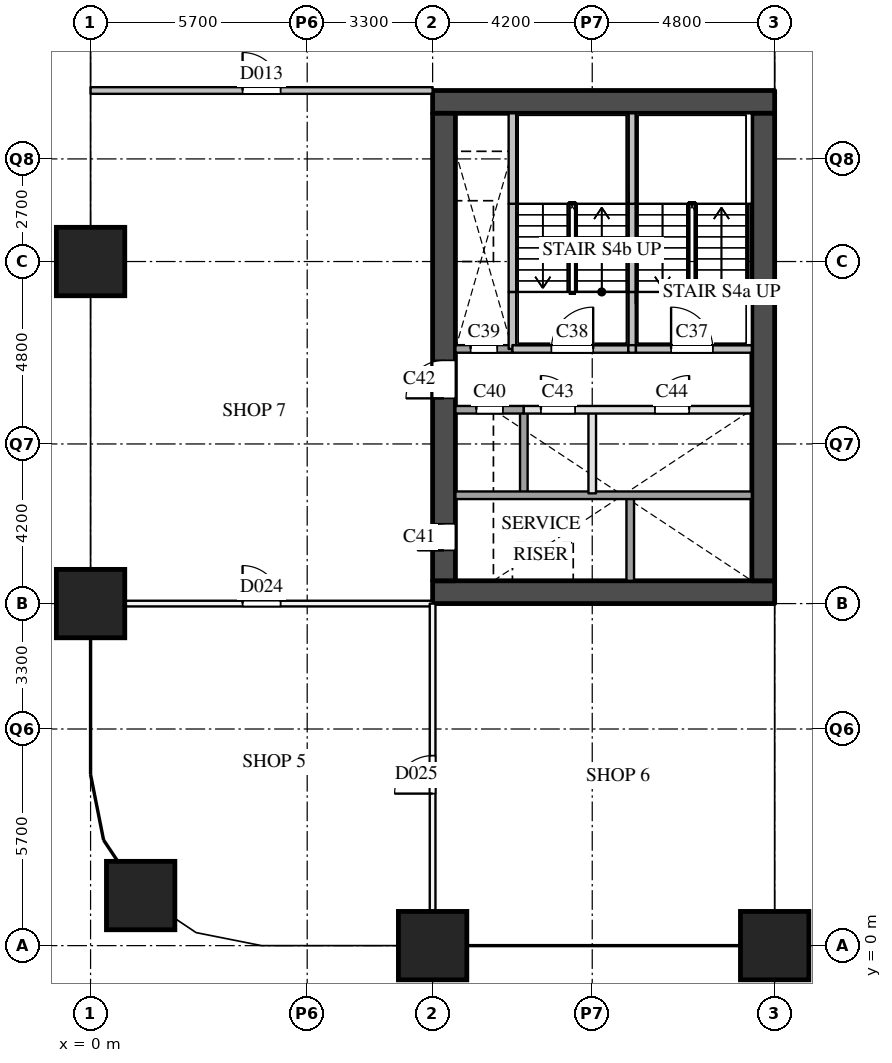
"""IFC4 building model, lengths in metres.
Left out: names, types, materials, properties, quantities, classifications, styles, units other than length and angle.
Written with IfcOpenShell. Run it as: python <this file> out.ifc"""

import sys

from ifc_helpers import new_model, si_unit, direction, frame, frame_2d, origin, origin_2d, place, context, subcontext, project, spatial, rectangle, extrude, element, fill, save


model = new_model("IFC4")
c1 = context("Model", 3, precision=1e-05, world=origin(), true_north=direction((0.0, 1.0)))
c2 = subcontext(c1, "Body", "Model", "MODEL_VIEW")
j1 = project(units=[si_unit("LENGTHUNIT", "METRE"), si_unit("PLANEANGLEUNIT", "RADIAN")], contexts=[c1])
p1 = place(None, origin())
s1 = spatial("IfcSite", under=j1, at=p1, CompositionType="ELEMENT")
p2 = place(p1, origin())
s2 = spatial("IfcBuilding", under=s1, at=p2, CompositionType="ELEMENT")
p3 = place(p2, frame((0.0, 0.0, 8.0)))
s3 = spatial("IfcBuildingStorey", under=s2, at=p3, CompositionType="ELEMENT", Elevation=8.0)
for number, where, z_axis, x_axis in (
    (1, (1.318, 1.318, 0.0), (0.0, 0.0, 1.0), (1.0, 0.0, 0.0)),
    (2, (0.0, 9.0, 0.0), (0.0, 0.0, 1.0), (1.0, 0.0, 0.0)),
    (3, (0.0, 18.0, 0.0), (0.0, 0.0, 1.0), (1.0, 0.0, 0.0)),
    (4, (9.0, 0.0, 0.0), (0.0, 0.0, 1.0), (1.0, 0.0, 0.0)),
    (5, (18.0, 0.0, 0.0), (0.0, 0.0, 1.0), (1.0, 0.0, 0.0)),
):
    element("IfcColumn", number, at=place(p3, frame(where, z_axis=z_axis, x_axis=x_axis)), inside=s3, PredefinedType="COLUMN", context=c2, shape_type="SweptSolid", body=[
        extrude(rectangle(XDim=1.8, YDim=1.8, at=origin_2d()), origin(), (0.0, 0.0, 1.0), 6.0),
    ])
for number, where, z_axis, x_axis in (
    (6, (9.0, 9.3, 0.0), (0.0, 0.0, 1.0), (1.0, 0.0, 0.0)),
    (7, (9.0, 22.2, 0.0), (0.0, 0.0, 1.0), (1.0, 0.0, 0.0)),
):
    element("IfcWall", number, at=place(p3, frame(where, z_axis=z_axis, x_axis=x_axis)), inside=s3, PredefinedType="SHEAR", context=c2, shape_type="SweptSolid", body=[
        extrude(rectangle(XDim=9.0, YDim=0.6, at=frame_2d((4.5, 0.0))), origin(), (0.0, 0.0, 1.0), 5.59),
    ])
p4 = place(p3, frame((9.3, 9.6, 0.0), z_axis=(0.0, 0.0, 1.0), x_axis=(0.0, 1.0, 0.0)))
e8 = element("IfcWall", 8, at=p4, inside=s3, PredefinedType="SHEAR", context=c2, shape_type="SweptSolid", body=[
    extrude(rectangle(XDim=12.3, YDim=0.6, at=frame_2d((6.15, 0.0))), origin(), (0.0, 0.0, 1.0), 5.59),
])
p5 = place(p4, frame((0.8, 0.0, 0.0)))
e9 = element("IfcOpeningElement", 9, at=p5, cuts=e8, PredefinedType="OPENING", context=c2, shape_type="SweptSolid", body=[
    extrude(rectangle(XDim=0.7, YDim=2.1, at=frame_2d((0.35, 1.05))), frame((0.0, 0.31, 0.0), z_axis=(0.0, -1.0, 0.0), x_axis=(1.0, 0.0, 0.0)), (0.0, 0.0, 1.0), 0.62),
])
p6 = place(p4, frame((4.8, 0.0, 0.0)))
e10 = element("IfcOpeningElement", 10, at=p6, cuts=e8, PredefinedType="OPENING", context=c2, shape_type="SweptSolid", body=[
    extrude(rectangle(XDim=1.0, YDim=2.1, at=frame_2d((0.5, 1.05))), frame((0.0, 0.31, 0.0), z_axis=(0.0, -1.0, 0.0), x_axis=(1.0, 0.0, 0.0)), (0.0, 0.0, 1.0), 0.62),
])
p7 = place(p3, frame((17.7, 9.6, 0.0), z_axis=(0.0, 0.0, 1.0), x_axis=(0.0, 1.0, 0.0)))
e11 = element("IfcWall", 11, at=p7, inside=s3, PredefinedType="SHEAR", context=c2, shape_type="SweptSolid", body=[
    extrude(rectangle(XDim=12.3, YDim=0.6, at=frame_2d((6.15, 0.0))), origin(), (0.0, 0.0, 1.0), 5.59),
])
p8 = place(p3, frame((11.1, 15.7, 0.0), z_axis=(0.0, 0.0, 1.0), x_axis=(0.0, 1.0, 0.0)))
e12 = element("IfcWall", 12, at=p8, inside=s3, PredefinedType="SOLIDWALL", context=c2, shape_type="SweptSolid", body=[
    extrude(rectangle(XDim=1.5, YDim=0.2, at=frame_2d((0.75, 0.0))), origin(), (0.0, 0.0, 1.0), 5.59),
])
p9 = place(p3, frame((11.1, 17.2, 0.0), z_axis=(0.0, 0.0, 1.0), x_axis=(0.0, 1.0, 0.0)))
e13 = element("IfcWall", 13, at=p9, inside=s3, PredefinedType="SOLIDWALL", context=c2, shape_type="SweptSolid", body=[
    extrude(rectangle(XDim=2.32, YDim=0.2, at=frame_2d((1.16, 0.0))), origin(), (0.0, 0.0, 1.0), 5.59),
])
p10 = place(p3, frame((11.1, 19.52, 0.0), z_axis=(0.0, 0.0, 1.0), x_axis=(0.0, 1.0, 0.0)))
e14 = element("IfcWall", 14, at=p10, inside=s3, PredefinedType="SOLIDWALL", context=c2, shape_type="SweptSolid", body=[
    extrude(rectangle(XDim=2.38, YDim=0.2, at=frame_2d((1.19, 0.0))), origin(), (0.0, 0.0, 1.0), 5.59),
])
p11 = place(p3, frame((11.4, 11.9, 0.0), z_axis=(0.0, 0.0, 1.0), x_axis=(0.0, 1.0, 0.0)))
e15 = element("IfcWall", 15, at=p11, inside=s3, PredefinedType="SOLIDWALL", context=c2, shape_type="SweptSolid", body=[
    extrude(rectangle(XDim=2.2, YDim=0.2, at=frame_2d((1.1, 0.0))), origin(), (0.0, 0.0, 1.0), 5.59),
])
p12 = place(p3, frame((13.2, 11.9, 0.0), z_axis=(0.0, 0.0, 1.0), x_axis=(0.0, 1.0, 0.0)))
e16 = element("IfcWall", 16, at=p12, inside=s3, PredefinedType="PARTITIONING", context=c2, shape_type="SweptSolid", body=[
    extrude(rectangle(XDim=2.2, YDim=0.2, at=frame_2d((1.1, 0.0))), origin(), (0.0, 0.0, 1.0), 5.59),
])
p13 = place(p3, frame((14.2, 9.6, 0.0), z_axis=(0.0, 0.0, 1.0), x_axis=(0.0, 1.0, 0.0)))
e17 = element("IfcWall", 17, at=p13, inside=s3, PredefinedType="SOLIDWALL", context=c2, shape_type="SweptSolid", body=[
    extrude(rectangle(XDim=2.3, YDim=0.2, at=frame_2d((1.15, 0.0))), origin(), (0.0, 0.0, 1.0), 5.59),
])
p14 = place(p3, frame((14.25, 15.7, 0.0), z_axis=(0.0, 0.0, 1.0), x_axis=(0.0, 1.0, 0.0)))
e18 = element("IfcWall", 18, at=p14, inside=s3, PredefinedType="SOLIDWALL", context=c2, shape_type="SweptSolid", body=[
    extrude(rectangle(XDim=1.5, YDim=0.2, at=frame_2d((0.75, 0.0))), origin(), (0.0, 0.0, 1.0), 5.59),
])
p15 = place(p3, frame((14.25, 17.2, 0.0), z_axis=(0.0, 0.0, 1.0), x_axis=(0.0, 1.0, 0.0)))
e19 = element("IfcWall", 19, at=p15, inside=s3, PredefinedType="SOLIDWALL", context=c2, shape_type="SweptSolid", body=[
    extrude(rectangle(XDim=2.32, YDim=0.2, at=frame_2d((1.16, 0.0))), origin(), (0.0, 0.0, 1.0), 5.59),
])
p16 = place(p3, frame((14.25, 19.52, 0.0), z_axis=(0.0, 0.0, 1.0), x_axis=(0.0, 1.0, 0.0)))
e20 = element("IfcWall", 20, at=p16, inside=s3, PredefinedType="SOLIDWALL", context=c2, shape_type="SweptSolid", body=[
    extrude(rectangle(XDim=2.38, YDim=0.2, at=frame_2d((1.19, 0.0))), origin(), (0.0, 0.0, 1.0), 5.59),
])
p17 = place(p3, frame((9.6, 11.85, 0.0), z_axis=(0.0, 0.0, 1.0), x_axis=(1.0, 0.0, 0.0)))
e21 = element("IfcWall", 21, at=p17, inside=s3, PredefinedType="SOLIDWALL", context=c2, shape_type="SweptSolid", body=[
    extrude(rectangle(XDim=7.8, YDim=0.2, at=frame_2d((3.9, 0.0))), origin(), (0.0, 0.0, 1.0), 5.59),
])
p18 = place(p3, frame((11.4, 14.1, 0.0), z_axis=(0.0, 0.0, 1.0), x_axis=(1.0, 0.0, 0.0)))
e22 = element("IfcWall", 22, at=p18, inside=s3, PredefinedType="PARTITIONING", context=c2, shape_type="SweptSolid", body=[
    extrude(rectangle(XDim=6.0, YDim=0.2, at=frame_2d((3.0, 0.0))), origin(), (0.0, 0.0, 1.0), 5.59),
])
p19 = place(p18, frame((0.45, 0.0, 0.0)))
e23 = element("IfcOpeningElement", 23, at=p19, cuts=e22, PredefinedType="OPENING", context=c2, shape_type="SweptSolid", body=[
    extrude(rectangle(XDim=0.9, YDim=2.1, at=frame_2d((0.45, 1.05))), frame((0.0, 0.11, 0.0), z_axis=(0.0, -1.0, 0.0), x_axis=(1.0, 0.0, 0.0)), (0.0, 0.0, 1.0), 0.22),
])
p20 = place(p18, frame((3.45, 0.0, 0.0)))
e24 = element("IfcOpeningElement", 24, at=p20, cuts=e22, PredefinedType="OPENING", context=c2, shape_type="SweptSolid", body=[
    extrude(rectangle(XDim=0.9, YDim=2.1, at=frame_2d((0.45, 1.05))), frame((0.0, 0.11, 0.0), z_axis=(0.0, -1.0, 0.0), x_axis=(1.0, 0.0, 0.0)), (0.0, 0.0, 1.0), 0.22),
])
p21 = place(p3, frame((9.6, 14.1, 0.0), z_axis=(0.0, 0.0, 1.0), x_axis=(1.0, 0.0, 0.0)))
e25 = element("IfcWall", 25, at=p21, inside=s3, PredefinedType="SOLIDWALL", context=c2, shape_type="SweptSolid", body=[
    extrude(rectangle(XDim=1.8, YDim=0.2, at=frame_2d((0.9, 0.0))), origin(), (0.0, 0.0, 1.0), 5.59),
])
p22 = place(p21, frame((0.55, 0.0, 0.0)))
e26 = element("IfcOpeningElement", 26, at=p22, cuts=e25, PredefinedType="OPENING", context=c2, shape_type="SweptSolid", body=[
    extrude(rectangle(XDim=0.7, YDim=2.1, at=frame_2d((0.35, 1.05))), frame((0.0, 0.11, 0.0), z_axis=(0.0, -1.0, 0.0), x_axis=(1.0, 0.0, 0.0)), (0.0, 0.0, 1.0), 0.22),
])
p23 = place(p3, frame((9.6, 15.7, 0.0), z_axis=(0.0, 0.0, 1.0), x_axis=(1.0, 0.0, 0.0)))
e27 = element("IfcWall", 27, at=p23, inside=s3, PredefinedType="SOLIDWALL", context=c2, shape_type="SweptSolid", body=[
    extrude(rectangle(XDim=1.5, YDim=0.2, at=frame_2d((0.75, 0.0))), origin(), (0.0, 0.0, 1.0), 5.59),
])
p24 = place(p23, frame((0.4, 0.0, 0.0)))
e28 = element("IfcOpeningElement", 28, at=p24, cuts=e27, PredefinedType="OPENING", context=c2, shape_type="SweptSolid", body=[
    extrude(rectangle(XDim=0.7, YDim=2.1, at=frame_2d((0.35, 1.05))), frame((0.0, 0.11, 0.0), z_axis=(0.0, -1.0, 0.0), x_axis=(1.0, 0.0, 0.0)), (0.0, 0.0, 1.0), 0.22),
])
p25 = place(p3, frame((11.1, 15.7, 0.0), z_axis=(0.0, 0.0, 1.0), x_axis=(1.0, 0.0, 0.0)))
e29 = element("IfcWall", 29, at=p25, inside=s3, PredefinedType="SOLIDWALL", context=c2, shape_type="SweptSolid", body=[
    extrude(rectangle(XDim=3.05, YDim=0.2, at=frame_2d((1.525, 0.0))), origin(), (0.0, 0.0, 1.0), 5.59),
])
p26 = place(p25, frame((1.025, 0.0, 0.0)))
e30 = element("IfcOpeningElement", 30, at=p26, cuts=e29, PredefinedType="OPENING", context=c2, shape_type="SweptSolid", body=[
    extrude(rectangle(XDim=1.1, YDim=2.1, at=frame_2d((0.55, 1.05))), frame((0.0, 0.11, 0.0), z_axis=(0.0, -1.0, 0.0), x_axis=(1.0, 0.0, 0.0)), (0.0, 0.0, 1.0), 0.22),
])
p27 = place(p3, frame((14.15, 15.7, 0.0), z_axis=(0.0, 0.0, 1.0), x_axis=(1.0, 0.0, 0.0)))
e31 = element("IfcWall", 31, at=p27, inside=s3, PredefinedType="SOLIDWALL", context=c2, shape_type="SweptSolid", body=[
    extrude(rectangle(XDim=0.2, YDim=0.2, at=frame_2d((0.1, 0.0))), origin(), (0.0, 0.0, 1.0), 5.59),
])
p28 = place(p3, frame((14.35, 15.7, 0.0), z_axis=(0.0, 0.0, 1.0), x_axis=(1.0, 0.0, 0.0)))
e32 = element("IfcWall", 32, at=p28, inside=s3, PredefinedType="SOLIDWALL", context=c2, shape_type="SweptSolid", body=[
    extrude(rectangle(XDim=3.05, YDim=0.2, at=frame_2d((1.525, 0.0))), origin(), (0.0, 0.0, 1.0), 5.59),
])
p29 = place(p28, frame((0.925, 0.0, 0.0)))
e33 = element("IfcOpeningElement", 33, at=p29, cuts=e32, PredefinedType="OPENING", context=c2, shape_type="SweptSolid", body=[
    extrude(rectangle(XDim=1.1, YDim=2.1, at=frame_2d((0.55, 1.05))), frame((0.0, 0.11, 0.0), z_axis=(0.0, -1.0, 0.0), x_axis=(1.0, 0.0, 0.0)), (0.0, 0.0, 1.0), 0.22),
])
p30 = place(p3, frame((0.0, 22.5, 0.0), z_axis=(0.0, 0.0, 1.0), x_axis=(1.0, 0.0, 0.0)))
e34 = element("IfcWall", 34, at=p30, inside=s3, PredefinedType="PARTITIONING", context=c2, shape_type="SweptSolid", body=[
    extrude(rectangle(XDim=9.0, YDim=0.175, at=frame_2d((4.5, 0.0))), origin(), (0.0, 0.0, 1.0), 4.59),
])
p31 = place(p30, frame((4.0, 0.0, 0.0)))
e35 = element("IfcOpeningElement", 35, at=p31, cuts=e34, PredefinedType="OPENING", context=c2, shape_type="SweptSolid", body=[
    extrude(rectangle(XDim=1.0, YDim=2.1, at=frame_2d((0.5, 1.05))), frame((0.0, 0.097, 0.0), z_axis=(0.0, -1.0, 0.0), x_axis=(1.0, 0.0, 0.0)), (0.0, 0.0, 1.0), 0.195),
])
p32 = place(p3, frame((0.0, 9.0, 0.0), z_axis=(0.0, 0.0, 1.0), x_axis=(1.0, 0.0, 0.0)))
e36 = element("IfcWall", 36, at=p32, inside=s3, PredefinedType="PARTITIONING", context=c2, shape_type="SweptSolid", body=[
    extrude(rectangle(XDim=9.0, YDim=0.15, at=frame_2d((4.5, 0.0))), origin(), (0.0, 0.0, 1.0), 5.59),
])
p33 = place(p32, frame((4.0, 0.0, 0.0)))
e37 = element("IfcOpeningElement", 37, at=p33, cuts=e36, PredefinedType="OPENING", context=c2, shape_type="SweptSolid", body=[
    extrude(rectangle(XDim=1.0, YDim=2.1, at=frame_2d((0.5, 1.05))), frame((0.0, 0.085, 0.0), z_axis=(0.0, -1.0, 0.0), x_axis=(1.0, 0.0, 0.0)), (0.0, 0.0, 1.0), 0.17),
])
p34 = place(p3, frame((9.0, 0.0, 0.0), z_axis=(0.0, 0.0, 1.0), x_axis=(0.0, 1.0, 0.0)))
e38 = element("IfcWall", 38, at=p34, inside=s3, PredefinedType="PARTITIONING", context=c2, shape_type="SweptSolid", body=[
    extrude(rectangle(XDim=9.0, YDim=0.15, at=frame_2d((4.5, 0.0))), origin(), (0.0, 0.0, 1.0), 5.59),
])
p35 = place(p34, frame((4.0, 0.0, 0.0)))
e39 = element("IfcOpeningElement", 39, at=p35, cuts=e38, PredefinedType="OPENING", context=c2, shape_type="SweptSolid", body=[
    extrude(rectangle(XDim=1.0, YDim=2.1, at=frame_2d((0.5, 1.05))), frame((0.0, 0.085, 0.0), z_axis=(0.0, -1.0, 0.0), x_axis=(1.0, 0.0, 0.0)), (0.0, 0.0, 1.0), 0.17),
])
p36 = place(p29, origin())
e40 = element("IfcDoor", 40, at=p36, inside=s3, OperationType="SINGLE_SWING_LEFT", PredefinedType="DOOR", context=c2, shape_type="SweptSolid", body=[
    extrude(rectangle(XDim=1.1, YDim=2.1, at=frame_2d((0.55, 1.05))), frame((0.0, 0.025, 0.0), z_axis=(0.0, -1.0, 0.0), x_axis=(1.0, 0.0, 0.0)), (0.0, 0.0, 1.0), 0.05),
])
fill(e33, e40)
p37 = place(p26, origin())
e41 = element("IfcDoor", 41, at=p37, inside=s3, OperationType="SINGLE_SWING_RIGHT", PredefinedType="DOOR", context=c2, shape_type="SweptSolid", body=[
    extrude(rectangle(XDim=1.1, YDim=2.1, at=frame_2d((0.55, 1.05))), frame((0.0, 0.025, 0.0), z_axis=(0.0, -1.0, 0.0), x_axis=(1.0, 0.0, 0.0)), (0.0, 0.0, 1.0), 0.05),
])
fill(e30, e41)
p38 = place(p24, origin())
e42 = element("IfcDoor", 42, at=p38, inside=s3, OperationType="SINGLE_SWING_LEFT", PredefinedType="DOOR", context=c2, shape_type="SweptSolid", body=[
    extrude(rectangle(XDim=0.7, YDim=2.1, at=frame_2d((0.35, 1.05))), frame((0.0, 0.025, 0.0), z_axis=(0.0, -1.0, 0.0), x_axis=(1.0, 0.0, 0.0)), (0.0, 0.0, 1.0), 0.05),
])
fill(e28, e42)
p39 = place(p22, origin())
e43 = element("IfcDoor", 43, at=p39, inside=s3, OperationType="SINGLE_SWING_LEFT", PredefinedType="DOOR", context=c2, shape_type="SweptSolid", body=[
    extrude(rectangle(XDim=0.7, YDim=2.1, at=frame_2d((0.35, 1.05))), frame((0.0, 0.025, 0.0), z_axis=(0.0, -1.0, 0.0), x_axis=(1.0, 0.0, 0.0)), (0.0, 0.0, 1.0), 0.05),
])
fill(e26, e43)
p40 = place(p5, origin())
e44 = element("IfcDoor", 44, at=p40, inside=s3, OperationType="SINGLE_SWING_LEFT", PredefinedType="DOOR", context=c2, shape_type="SweptSolid", body=[
    extrude(rectangle(XDim=0.7, YDim=2.1, at=frame_2d((0.35, 1.05))), frame((0.0, 0.025, 0.0), z_axis=(0.0, -1.0, 0.0), x_axis=(1.0, 0.0, 0.0)), (0.0, 0.0, 1.0), 0.05),
])
fill(e9, e44)
p41 = place(p6, origin())
e45 = element("IfcDoor", 45, at=p41, inside=s3, OperationType="SINGLE_SWING_LEFT", PredefinedType="DOOR", context=c2, shape_type="SweptSolid", body=[
    extrude(rectangle(XDim=1.0, YDim=2.1, at=frame_2d((0.5, 1.05))), frame((0.0, 0.025, 0.0), z_axis=(0.0, -1.0, 0.0), x_axis=(1.0, 0.0, 0.0)), (0.0, 0.0, 1.0), 0.05),
])
fill(e10, e45)
p42 = place(p19, origin())
e46 = element("IfcDoor", 46, at=p42, inside=s3, OperationType="SINGLE_SWING_LEFT", PredefinedType="DOOR", context=c2, shape_type="SweptSolid", body=[
    extrude(rectangle(XDim=0.9, YDim=2.1, at=frame_2d((0.45, 1.05))), frame((0.0, 0.025, 0.0), z_axis=(0.0, -1.0, 0.0), x_axis=(1.0, 0.0, 0.0)), (0.0, 0.0, 1.0), 0.05),
])
fill(e23, e46)
p43 = place(p20, origin())
e47 = element("IfcDoor", 47, at=p43, inside=s3, OperationType="SINGLE_SWING_RIGHT", PredefinedType="DOOR", context=c2, shape_type="SweptSolid", body=[
    extrude(rectangle(XDim=0.9, YDim=2.1, at=frame_2d((0.45, 1.05))), frame((0.0, 0.025, 0.0), z_axis=(0.0, -1.0, 0.0), x_axis=(1.0, 0.0, 0.0)), (0.0, 0.0, 1.0), 0.05),
])
fill(e24, e47)
p44 = place(p31, origin())
e48 = element("IfcDoor", 48, at=p44, inside=s3, OperationType="SINGLE_SWING_LEFT", PredefinedType="DOOR", context=c2, shape_type="SweptSolid", body=[
    extrude(rectangle(XDim=1.0, YDim=2.1, at=frame_2d((0.5, 1.05))), frame((0.0, 0.025, 0.0), z_axis=(0.0, -1.0, 0.0), x_axis=(1.0, 0.0, 0.0)), (0.0, 0.0, 1.0), 0.05),
])
fill(e35, e48)
p45 = place(p33, origin())
e49 = element("IfcDoor", 49, at=p45, inside=s3, OperationType="SINGLE_SWING_LEFT", PredefinedType="DOOR", context=c2, shape_type="SweptSolid", body=[
    extrude(rectangle(XDim=1.0, YDim=2.1, at=frame_2d((0.5, 1.05))), frame((0.0, 0.025, 0.0), z_axis=(0.0, -1.0, 0.0), x_axis=(1.0, 0.0, 0.0)), (0.0, 0.0, 1.0), 0.05),
])
fill(e37, e49)
p46 = place(p35, origin())
e50 = element("IfcDoor", 50, at=p46, inside=s3, OperationType="SINGLE_SWING_LEFT", PredefinedType="DOOR", context=c2, shape_type="SweptSolid", body=[
    extrude(rectangle(XDim=1.0, YDim=2.1, at=frame_2d((0.5, 1.05))), frame((0.0, 0.025, 0.0), z_axis=(0.0, -1.0, 0.0), x_axis=(1.0, 0.0, 0.0)), (0.0, 0.0, 1.0), 0.05),
])
fill(e39, e50)
save(model, sys.argv[1])
